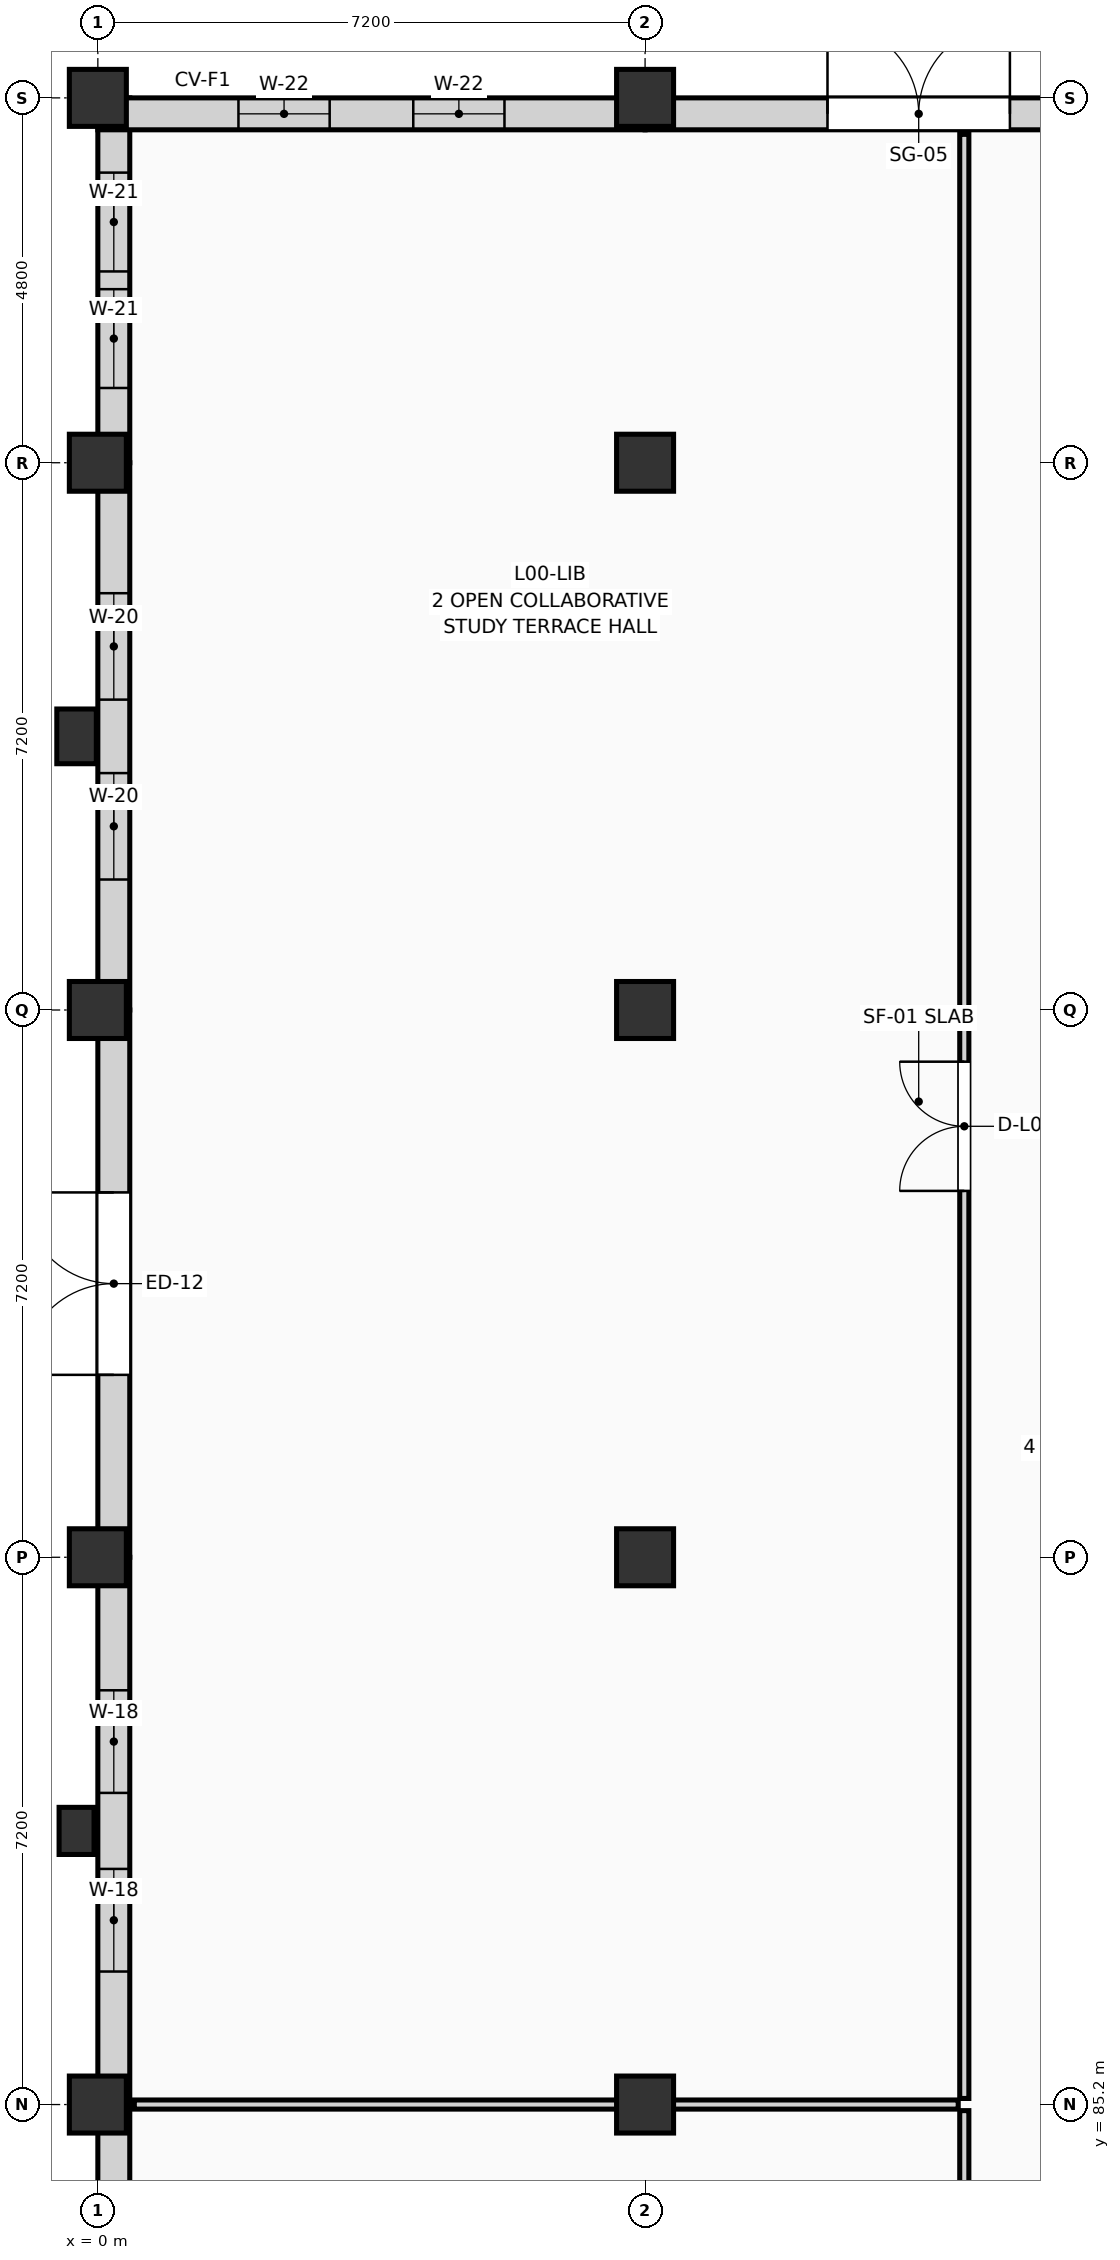
"""IFC4 building model, lengths in metres.
Left out: names, types, materials, properties, quantities, classifications, styles, units other than length and angle.
Written with IfcOpenShell. Run it as: python <this file> out.ifc"""

import sys

from ifc_helpers import new_model, si_unit, direction, frame, frame_2d, origin, origin_2d, place, context, subcontext, project, spatial, rectangle, extrude, element, fill, save


model = new_model("IFC4")
c1 = context("Model", 3, precision=1e-05, world=origin(), true_north=direction((0.0, 1.0)))
c2 = subcontext(c1, "Body", "Model", "MODEL_VIEW")
j1 = project(units=[si_unit("LENGTHUNIT", "METRE"), si_unit("PLANEANGLEUNIT", "RADIAN")], contexts=[c1])
p1 = place(None, origin())
s1 = spatial("IfcSite", under=j1, at=p1, CompositionType="ELEMENT")
p2 = place(p1, origin())
s2 = spatial("IfcBuilding", under=s1, at=p2, CompositionType="ELEMENT")
p3 = place(p2, origin())
s3 = spatial("IfcBuildingStorey", under=s2, at=p3, CompositionType="ELEMENT", Elevation=0.0)
for number, where, z_axis, x_axis in (
    (1, (0.0, 85.2, 0.0), (0.0, 0.0, 1.0), (1.0, 0.0, 0.0)),
    (2, (0.0, 92.4, 0.0), (0.0, 0.0, 1.0), (1.0, 0.0, 0.0)),
    (3, (0.0, 99.6, 0.0), (0.0, 0.0, 1.0), (1.0, 0.0, 0.0)),
    (4, (0.0, 106.8, 0.0), (0.0, 0.0, 1.0), (1.0, 0.0, 0.0)),
    (5, (0.0, 111.6, 0.0), (0.0, 0.0, 1.0), (1.0, 0.0, 0.0)),
    (6, (7.2, 85.2, 0.0), (0.0, 0.0, 1.0), (1.0, 0.0, 0.0)),
    (7, (7.2, 92.4, 0.0), (0.0, 0.0, 1.0), (1.0, 0.0, 0.0)),
    (8, (7.2, 99.6, 0.0), (0.0, 0.0, 1.0), (1.0, 0.0, 0.0)),
    (9, (7.2, 106.8, 0.0), (0.0, 0.0, 1.0), (1.0, 0.0, 0.0)),
    (10, (7.2, 111.6, 0.0), (0.0, 0.0, 1.0), (1.0, 0.0, 0.0)),
):
    element("IfcColumn", number, at=place(p3, frame(where, z_axis=z_axis, x_axis=x_axis)), inside=s3, PredefinedType="COLUMN", context=c2, shape_type="SweptSolid", body=[
        extrude(rectangle(XDim=0.75, YDim=0.75, at=origin_2d()), origin(), (0.0, 0.0, 1.0), 4.5),
    ])
p4 = place(p3, frame((-0.28, 88.8, 0.0), z_axis=(0.0, 0.0, 1.0), x_axis=(1.0, 0.0, 0.0)))
e11 = element("IfcColumn", 11, at=p4, inside=s3, PredefinedType="PILASTER", context=c2, shape_type="SweptSolid", body=[
    extrude(rectangle(XDim=0.46, YDim=0.62, at=origin_2d()), origin(), (0.0, 0.0, 1.0), 4.5),
])
p5 = place(p3, frame((-0.28, 103.2, 0.0), z_axis=(0.0, 0.0, 1.0), x_axis=(1.0, 0.0, 0.0)))
e12 = element("IfcColumn", 12, at=p5, inside=s3, PredefinedType="PILASTER", context=c2, shape_type="SweptSolid", body=[
    extrude(rectangle(XDim=0.52, YDim=0.72, at=origin_2d()), origin(), (0.0, 0.0, 1.0), 4.5),
])
p6 = place(p3, frame((0.21, 78.0, 0.0), z_axis=(0.0, 0.0, 1.0), x_axis=(0.0, 1.0, 0.0)))
e13 = element("IfcWall", 13, at=p6, inside=s3, PredefinedType="SOLIDWALL", context=c2, shape_type="SweptSolid", body=[
    extrude(rectangle(XDim=7.2, YDim=0.42, at=frame_2d((3.6, 0.0))), origin(), (0.0, 0.0, 1.0), 3.62),
])
p7 = place(p6, frame((1.683, 0.0, 0.45)))
e14 = element("IfcOpeningElement", 14, at=p7, cuts=e13, PredefinedType="OPENING", context=c2, shape_type="SweptSolid", body=[
    extrude(rectangle(XDim=1.45, YDim=2.5, at=frame_2d((0.725, 1.25))), frame((0.0, 0.222, 0.0), z_axis=(0.0, -1.0, 0.0), x_axis=(1.0, 0.0, 0.0)), (0.0, 0.0, 1.0), 0.444),
])
p8 = place(p6, frame((4.067, 0.0, 0.45)))
e15 = element("IfcOpeningElement", 15, at=p8, cuts=e13, PredefinedType="OPENING", context=c2, shape_type="SweptSolid", body=[
    extrude(rectangle(XDim=1.45, YDim=2.5, at=frame_2d((0.725, 1.25))), frame((0.0, 0.222, 0.0), z_axis=(0.0, -1.0, 0.0), x_axis=(1.0, 0.0, 0.0)), (0.0, 0.0, 1.0), 0.444),
])
p9 = place(p3, frame((0.21, 85.2, 0.0), z_axis=(0.0, 0.0, 1.0), x_axis=(0.0, 1.0, 0.0)))
e16 = element("IfcWall", 16, at=p9, inside=s3, PredefinedType="SOLIDWALL", context=c2, shape_type="SweptSolid", body=[
    extrude(rectangle(XDim=7.2, YDim=0.42, at=frame_2d((3.6, 0.0))), origin(), (0.0, 0.0, 1.0), 3.62),
])
p10 = place(p9, frame((1.75, 0.0, 0.45)))
e17 = element("IfcOpeningElement", 17, at=p10, cuts=e16, PredefinedType="OPENING", context=c2, shape_type="SweptSolid", body=[
    extrude(rectangle(XDim=1.35, YDim=2.45, at=frame_2d((0.675, 1.225))), frame((0.0, 0.222, 0.0), z_axis=(0.0, -1.0, 0.0), x_axis=(1.0, 0.0, 0.0)), (0.0, 0.0, 1.0), 0.444),
])
p11 = place(p9, frame((4.1, 0.0, 0.45)))
e18 = element("IfcOpeningElement", 18, at=p11, cuts=e16, PredefinedType="OPENING", context=c2, shape_type="SweptSolid", body=[
    extrude(rectangle(XDim=1.35, YDim=2.45, at=frame_2d((0.675, 1.225))), frame((0.0, 0.222, 0.0), z_axis=(0.0, -1.0, 0.0), x_axis=(1.0, 0.0, 0.0)), (0.0, 0.0, 1.0), 0.444),
])
p12 = place(p3, frame((0.21, 92.4, 0.0), z_axis=(0.0, 0.0, 1.0), x_axis=(0.0, 1.0, 0.0)))
e19 = element("IfcWall", 19, at=p12, inside=s3, PredefinedType="SOLIDWALL", context=c2, shape_type="SweptSolid", body=[
    extrude(rectangle(XDim=7.2, YDim=0.42, at=frame_2d((3.6, 0.0))), origin(), (0.0, 0.0, 1.0), 3.62),
])
p13 = place(p12, frame((2.4, 0.0, 0.0)))
e20 = element("IfcOpeningElement", 20, at=p13, cuts=e19, PredefinedType="OPENING", context=c2, shape_type="SweptSolid", body=[
    extrude(rectangle(XDim=2.4, YDim=2.6, at=frame_2d((1.2, 1.3))), frame((0.0, 0.222, 0.0), z_axis=(0.0, -1.0, 0.0), x_axis=(1.0, 0.0, 0.0)), (0.0, 0.0, 1.0), 0.444),
])
p14 = place(p3, frame((0.21, 99.6, 0.0), z_axis=(0.0, 0.0, 1.0), x_axis=(0.0, 1.0, 0.0)))
e21 = element("IfcWall", 21, at=p14, inside=s3, PredefinedType="SOLIDWALL", context=c2, shape_type="SweptSolid", body=[
    extrude(rectangle(XDim=7.2, YDim=0.42, at=frame_2d((3.6, 0.0))), origin(), (0.0, 0.0, 1.0), 3.62),
])
p15 = place(p14, frame((1.717, 0.0, 0.45)))
e22 = element("IfcOpeningElement", 22, at=p15, cuts=e21, PredefinedType="OPENING", context=c2, shape_type="SweptSolid", body=[
    extrude(rectangle(XDim=1.4, YDim=2.38, at=frame_2d((0.7, 1.19))), frame((0.0, 0.222, 0.0), z_axis=(0.0, -1.0, 0.0), x_axis=(1.0, 0.0, 0.0)), (0.0, 0.0, 1.0), 0.444),
])
p16 = place(p14, frame((4.083, 0.0, 0.45)))
e23 = element("IfcOpeningElement", 23, at=p16, cuts=e21, PredefinedType="OPENING", context=c2, shape_type="SweptSolid", body=[
    extrude(rectangle(XDim=1.4, YDim=2.38, at=frame_2d((0.7, 1.19))), frame((0.0, 0.222, 0.0), z_axis=(0.0, -1.0, 0.0), x_axis=(1.0, 0.0, 0.0)), (0.0, 0.0, 1.0), 0.444),
])
p17 = place(p3, frame((0.21, 106.8, 0.0), z_axis=(0.0, 0.0, 1.0), x_axis=(0.0, 1.0, 0.0)))
e24 = element("IfcWall", 24, at=p17, inside=s3, PredefinedType="SOLIDWALL", context=c2, shape_type="SweptSolid", body=[
    extrude(rectangle(XDim=4.8, YDim=0.42, at=frame_2d((2.4, 0.0))), origin(), (0.0, 0.0, 1.0), 3.62),
])
p18 = place(p17, frame((0.983, 0.0, 0.45)))
e25 = element("IfcOpeningElement", 25, at=p18, cuts=e24, PredefinedType="OPENING", context=c2, shape_type="SweptSolid", body=[
    extrude(rectangle(XDim=1.3, YDim=2.35, at=frame_2d((0.65, 1.175))), frame((0.0, 0.222, 0.0), z_axis=(0.0, -1.0, 0.0), x_axis=(1.0, 0.0, 0.0)), (0.0, 0.0, 1.0), 0.444),
])
p19 = place(p17, frame((2.517, 0.0, 0.45)))
e26 = element("IfcOpeningElement", 26, at=p19, cuts=e24, PredefinedType="OPENING", context=c2, shape_type="SweptSolid", body=[
    extrude(rectangle(XDim=1.3, YDim=2.35, at=frame_2d((0.65, 1.175))), frame((0.0, 0.222, 0.0), z_axis=(0.0, -1.0, 0.0), x_axis=(1.0, 0.0, 0.0)), (0.0, 0.0, 1.0), 0.444),
])
p20 = place(p3, frame((0.0, 111.39, 0.0), z_axis=(0.0, 0.0, 1.0), x_axis=(1.0, 0.0, 0.0)))
e27 = element("IfcWall", 27, at=p20, inside=s3, PredefinedType="SOLIDWALL", context=c2, shape_type="SweptSolid", body=[
    extrude(rectangle(XDim=7.2, YDim=0.42, at=frame_2d((3.6, 0.0))), origin(), (0.0, 0.0, 1.0), 3.62),
])
p21 = place(p20, frame((1.85, 0.0, 0.45)))
e28 = element("IfcOpeningElement", 28, at=p21, cuts=e27, PredefinedType="OPENING", context=c2, shape_type="SweptSolid", body=[
    extrude(rectangle(XDim=1.2, YDim=2.35, at=frame_2d((0.6, 1.175))), frame((0.0, 0.222, 0.0), z_axis=(0.0, -1.0, 0.0), x_axis=(1.0, 0.0, 0.0)), (0.0, 0.0, 1.0), 0.444),
])
p22 = place(p20, frame((4.15, 0.0, 0.45)))
e29 = element("IfcOpeningElement", 29, at=p22, cuts=e27, PredefinedType="OPENING", context=c2, shape_type="SweptSolid", body=[
    extrude(rectangle(XDim=1.2, YDim=2.35, at=frame_2d((0.6, 1.175))), frame((0.0, 0.222, 0.0), z_axis=(0.0, -1.0, 0.0), x_axis=(1.0, 0.0, 0.0)), (0.0, 0.0, 1.0), 0.444),
])
p23 = place(p3, frame((7.2, 111.39, 0.0), z_axis=(0.0, 0.0, 1.0), x_axis=(1.0, 0.0, 0.0)))
e30 = element("IfcWall", 30, at=p23, inside=s3, PredefinedType="SOLIDWALL", context=c2, shape_type="SweptSolid", body=[
    extrude(rectangle(XDim=7.2, YDim=0.42, at=frame_2d((3.6, 0.0))), origin(), (0.0, 0.0, 1.0), 3.62),
])
p24 = place(p23, frame((2.4, 0.0, 0.0)))
e31 = element("IfcOpeningElement", 31, at=p24, cuts=e30, PredefinedType="OPENING", context=c2, shape_type="SweptSolid", body=[
    extrude(rectangle(XDim=2.4, YDim=2.6, at=frame_2d((1.2, 1.3))), frame((0.0, 0.222, 0.0), z_axis=(0.0, -1.0, 0.0), x_axis=(1.0, 0.0, 0.0)), (0.0, 0.0, 1.0), 0.444),
])
p25 = place(p3, frame((11.4, 56.68, 0.0), z_axis=(0.0, 0.0, 1.0), x_axis=(0.0, 1.0, 0.0)))
e32 = element("IfcWall", 32, at=p25, inside=s3, PredefinedType="PARTITIONING", context=c2, shape_type="SweptSolid", body=[
    extrude(rectangle(XDim=28.44, YDim=0.12, at=frame_2d((14.22, 0.0))), origin(), (0.0, 0.0, 1.0), 4.235),
])
p26 = place(p25, frame((13.37, 0.0, 0.0)))
e33 = element("IfcOpeningElement", 33, at=p26, cuts=e32, PredefinedType="OPENING", context=c2, shape_type="SweptSolid", body=[
    extrude(rectangle(XDim=1.7, YDim=2.28, at=frame_2d((0.85, 1.14))), frame((0.0, 0.072, 0.0), z_axis=(0.0, -1.0, 0.0), x_axis=(1.0, 0.0, 0.0)), (0.0, 0.0, 1.0), 0.144),
])
p27 = place(p3, frame((0.48, 85.2, 0.0), z_axis=(0.0, 0.0, 1.0), x_axis=(1.0, 0.0, 0.0)))
e34 = element("IfcWall", 34, at=p27, inside=s3, PredefinedType="PARTITIONING", context=c2, shape_type="SweptSolid", body=[
    extrude(rectangle(XDim=10.84, YDim=0.12, at=frame_2d((5.42, 0.0))), origin(), (0.0, 0.0, 1.0), 3.485),
])
p28 = place(p3, frame((11.4, 85.28, 0.0), z_axis=(0.0, 0.0, 1.0), x_axis=(0.0, 1.0, 0.0)))
e35 = element("IfcWall", 35, at=p28, inside=s3, PredefinedType="PARTITIONING", context=c2, shape_type="SweptSolid", body=[
    extrude(rectangle(XDim=25.84, YDim=0.12, at=frame_2d((12.92, 0.0))), origin(), (0.0, 0.0, 1.0), 4.235),
])
p29 = place(p28, frame((11.94, 0.0, 0.0)))
e36 = element("IfcOpeningElement", 36, at=p29, cuts=e35, PredefinedType="OPENING", context=c2, shape_type="SweptSolid", body=[
    extrude(rectangle(XDim=1.7, YDim=2.28, at=frame_2d((0.85, 1.14))), frame((0.0, 0.072, 0.0), z_axis=(0.0, -1.0, 0.0), x_axis=(1.0, 0.0, 0.0)), (0.0, 0.0, 1.0), 0.144),
])
p30 = place(p10, origin())
e37 = element("IfcWindow", 37, at=p30, inside=s3, PartitioningType="SINGLE_PANEL", PredefinedType="WINDOW", context=c2, shape_type="SweptSolid", body=[
    extrude(rectangle(XDim=1.35, YDim=2.45, at=frame_2d((0.675, 1.225))), frame((0.0, 0.03, 0.0), z_axis=(0.0, -1.0, 0.0), x_axis=(1.0, 0.0, 0.0)), (0.0, 0.0, 1.0), 0.06),
])
fill(e17, e37)
p31 = place(p11, origin())
e38 = element("IfcWindow", 38, at=p31, inside=s3, PartitioningType="SINGLE_PANEL", PredefinedType="WINDOW", context=c2, shape_type="SweptSolid", body=[
    extrude(rectangle(XDim=1.35, YDim=2.45, at=frame_2d((0.675, 1.225))), frame((0.0, 0.03, 0.0), z_axis=(0.0, -1.0, 0.0), x_axis=(1.0, 0.0, 0.0)), (0.0, 0.0, 1.0), 0.06),
])
fill(e18, e38)
p32 = place(p13, origin())
e39 = element("IfcDoor", 39, at=p32, inside=s3, OperationType="DOUBLE_DOOR_SINGLE_SWING", PredefinedType="DOOR", context=c2, shape_type="SweptSolid", body=[
    extrude(rectangle(XDim=2.4, YDim=2.6, at=frame_2d((1.2, 1.3))), frame((0.0, 0.025, 0.0), z_axis=(0.0, -1.0, 0.0), x_axis=(1.0, 0.0, 0.0)), (0.0, 0.0, 1.0), 0.05),
])
fill(e20, e39)
p33 = place(p15, origin())
e40 = element("IfcWindow", 40, at=p33, inside=s3, PartitioningType="SINGLE_PANEL", PredefinedType="WINDOW", context=c2, shape_type="SweptSolid", body=[
    extrude(rectangle(XDim=1.4, YDim=2.38, at=frame_2d((0.7, 1.19))), frame((0.0, 0.03, 0.0), z_axis=(0.0, -1.0, 0.0), x_axis=(1.0, 0.0, 0.0)), (0.0, 0.0, 1.0), 0.06),
])
fill(e22, e40)
p34 = place(p16, origin())
e41 = element("IfcWindow", 41, at=p34, inside=s3, PartitioningType="SINGLE_PANEL", PredefinedType="WINDOW", context=c2, shape_type="SweptSolid", body=[
    extrude(rectangle(XDim=1.4, YDim=2.38, at=frame_2d((0.7, 1.19))), frame((0.0, 0.03, 0.0), z_axis=(0.0, -1.0, 0.0), x_axis=(1.0, 0.0, 0.0)), (0.0, 0.0, 1.0), 0.06),
])
fill(e23, e41)
p35 = place(p18, origin())
e42 = element("IfcWindow", 42, at=p35, inside=s3, PartitioningType="SINGLE_PANEL", PredefinedType="WINDOW", context=c2, shape_type="SweptSolid", body=[
    extrude(rectangle(XDim=1.3, YDim=2.35, at=frame_2d((0.65, 1.175))), frame((0.0, 0.03, 0.0), z_axis=(0.0, -1.0, 0.0), x_axis=(1.0, 0.0, 0.0)), (0.0, 0.0, 1.0), 0.06),
])
fill(e25, e42)
p36 = place(p19, origin())
e43 = element("IfcWindow", 43, at=p36, inside=s3, PartitioningType="SINGLE_PANEL", PredefinedType="WINDOW", context=c2, shape_type="SweptSolid", body=[
    extrude(rectangle(XDim=1.3, YDim=2.35, at=frame_2d((0.65, 1.175))), frame((0.0, 0.03, 0.0), z_axis=(0.0, -1.0, 0.0), x_axis=(1.0, 0.0, 0.0)), (0.0, 0.0, 1.0), 0.06),
])
fill(e26, e43)
p37 = place(p21, origin())
e44 = element("IfcWindow", 44, at=p37, inside=s3, PartitioningType="SINGLE_PANEL", PredefinedType="WINDOW", context=c2, shape_type="SweptSolid", body=[
    extrude(rectangle(XDim=1.2, YDim=2.35, at=frame_2d((0.6, 1.175))), frame((0.0, 0.03, 0.0), z_axis=(0.0, -1.0, 0.0), x_axis=(1.0, 0.0, 0.0)), (0.0, 0.0, 1.0), 0.06),
])
fill(e28, e44)
p38 = place(p22, origin())
e45 = element("IfcWindow", 45, at=p38, inside=s3, PartitioningType="SINGLE_PANEL", PredefinedType="WINDOW", context=c2, shape_type="SweptSolid", body=[
    extrude(rectangle(XDim=1.2, YDim=2.35, at=frame_2d((0.6, 1.175))), frame((0.0, 0.03, 0.0), z_axis=(0.0, -1.0, 0.0), x_axis=(1.0, 0.0, 0.0)), (0.0, 0.0, 1.0), 0.06),
])
fill(e29, e45)
p39 = place(p24, origin())
e46 = element("IfcDoor", 46, at=p39, inside=s3, OperationType="DOUBLE_DOOR_SINGLE_SWING", PredefinedType="GATE", context=c2, shape_type="SweptSolid", body=[
    extrude(rectangle(XDim=2.4, YDim=2.6, at=frame_2d((1.2, 1.3))), frame((0.0, 0.025, 0.0), z_axis=(0.0, -1.0, 0.0), x_axis=(1.0, 0.0, 0.0)), (0.0, 0.0, 1.0), 0.05),
])
fill(e31, e46)
p40 = place(p29, origin())
e47 = element("IfcDoor", 47, at=p40, inside=s3, OperationType="DOUBLE_DOOR_SINGLE_SWING", PredefinedType="DOOR", context=c2, shape_type="SweptSolid", body=[
    extrude(rectangle(XDim=1.7, YDim=2.28, at=frame_2d((0.85, 1.14))), frame((0.0, 0.025, 0.0), z_axis=(0.0, -1.0, 0.0), x_axis=(1.0, 0.0, 0.0)), (0.0, 0.0, 1.0), 0.05),
])
fill(e36, e47)
save(model, sys.argv[1])
